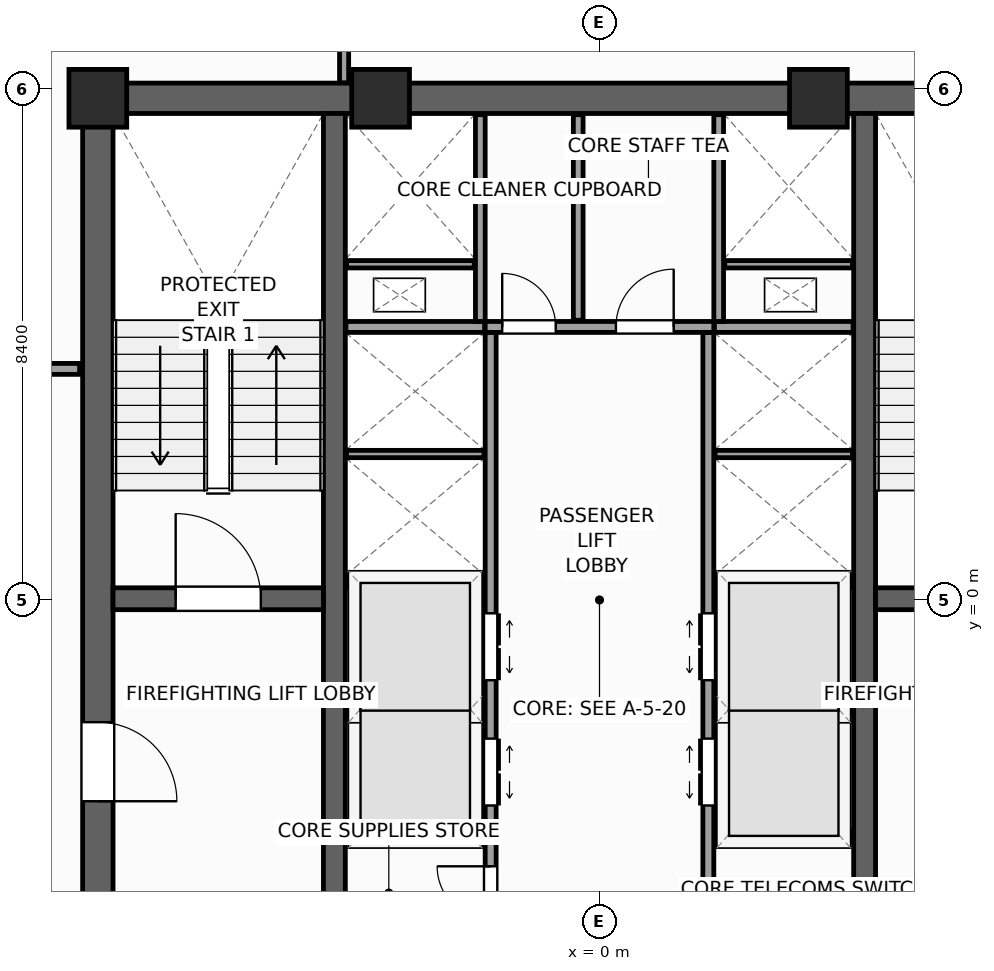
"""IFC4 building model, lengths in metres.
Left out: names, types, materials, properties, quantities, classifications, styles, units other than length and angle.
Written with IfcOpenShell. Run it as: python <this file> out.ifc"""

import sys

from ifc_helpers import new_model, si_unit, direction, frame, frame_2d, origin, origin_2d, place, context, subcontext, project, spatial, rectangle, extrude, source, transform, mapped, element, fill, save


model = new_model("IFC4")
c1 = context("Model", 3, precision=1e-05, world=origin(), true_north=direction((0.0, 1.0)))
c2 = subcontext(c1, "Body", "Model", "MODEL_VIEW")
j1 = project(units=[si_unit("LENGTHUNIT", "METRE"), si_unit("PLANEANGLEUNIT", "RADIAN")], contexts=[c1])
p1 = place(None, origin())
s1 = spatial("IfcSite", under=j1, at=p1, CompositionType="ELEMENT")
p2 = place(p1, origin())
s2 = spatial("IfcBuilding", under=s1, at=p2, CompositionType="ELEMENT")
p3 = place(p2, frame((0.0, 0.0, 221.2)))
s3 = spatial("IfcBuildingStorey", under=s2, at=p3, CompositionType="ELEMENT", Elevation=221.2)
p4 = place(p3, frame((-8.5, 8.25, 0.0), z_axis=(0.0, 0.0, 1.0), x_axis=(1.0, 0.0, 0.0)))
e1 = element("IfcWall", 1, at=p4, inside=s3, PredefinedType="SHEAR", context=c2, shape_type="SweptSolid", body=[
    extrude(rectangle(XDim=17.0, YDim=0.5, at=frame_2d((8.5, 0.0))), origin(), (0.0, 0.0, 1.0), 3.9),
])
p5 = place(p3, frame((-8.25, -8.0, 0.0), z_axis=(0.0, 0.0, 1.0), x_axis=(0.0, 1.0, 0.0)))
e2 = element("IfcWall", 2, at=p5, inside=s3, PredefinedType="SHEAR", context=c2, shape_type="SweptSolid", body=[
    extrude(rectangle(XDim=16.0, YDim=0.5, at=frame_2d((8.0, 0.0))), origin(), (0.0, 0.0, 1.0), 3.9),
])
p6 = place(p5, frame((4.69, 0.0, 0.0)))
e3 = element("IfcOpeningElement", 3, at=p6, cuts=e2, PredefinedType="OPENING", context=c2, shape_type="SweptSolid", body=[
    extrude(rectangle(XDim=1.3, YDim=2.2, at=frame_2d((0.65, 1.1))), frame((0.0, 0.26, 0.0), z_axis=(0.0, -1.0, 0.0), x_axis=(1.0, 0.0, 0.0)), (0.0, 0.0, 1.0), 0.52),
])
for number, where, z_axis, x_axis in (
    (4, (-4.36, -8.0, 0.0), (0.0, 0.0, 1.0), (0.0, 1.0, 0.0)),
    (5, (4.36, -8.0, 0.0), (0.0, 0.0, 1.0), (0.0, 1.0, 0.0)),
):
    element("IfcWall", number, at=place(p3, frame(where, z_axis=z_axis, x_axis=x_axis)), inside=s3, PredefinedType="SHEAR", context=c2, shape_type="SweptSolid", body=[
        extrude(rectangle(XDim=16.0, YDim=0.36, at=frame_2d((8.0, 0.0))), origin(), (0.0, 0.0, 1.0), 3.9),
    ])
p7 = place(p3, frame((-8.0, 0.02, 0.0), z_axis=(0.0, 0.0, 1.0), x_axis=(1.0, 0.0, 0.0)))
e6 = element("IfcWall", 6, at=p7, inside=s3, PredefinedType="SHEAR", context=c2, shape_type="SweptSolid", body=[
    extrude(rectangle(XDim=3.46, YDim=0.36, at=frame_2d((1.73, 0.0))), origin(), (0.0, 0.0, 1.0), 3.9),
])
p8 = place(p7, frame((1.03, 0.0, 0.0)))
e7 = element("IfcOpeningElement", 7, at=p8, cuts=e6, PredefinedType="OPENING", context=c2, shape_type="SweptSolid", body=[
    extrude(rectangle(XDim=1.4, YDim=2.2, at=frame_2d((0.7, 1.1))), frame((0.0, 0.19, 0.0), z_axis=(0.0, -1.0, 0.0), x_axis=(1.0, 0.0, 0.0)), (0.0, 0.0, 1.0), 0.38),
])
p9 = place(p3, frame((4.54, 0.02, 0.0), z_axis=(0.0, 0.0, 1.0), x_axis=(1.0, 0.0, 0.0)))
e8 = element("IfcWall", 8, at=p9, inside=s3, PredefinedType="SHEAR", context=c2, shape_type="SweptSolid", body=[
    extrude(rectangle(XDim=3.46, YDim=0.36, at=frame_2d((1.73, 0.0))), origin(), (0.0, 0.0, 1.0), 3.9),
])
p10 = place(p9, frame((1.03, 0.0, 0.0)))
e9 = element("IfcOpeningElement", 9, at=p10, cuts=e8, PredefinedType="OPENING", context=c2, shape_type="SweptSolid", body=[
    extrude(rectangle(XDim=1.4, YDim=2.2, at=frame_2d((0.7, 1.1))), frame((0.0, 0.19, 0.0), z_axis=(0.0, -1.0, 0.0), x_axis=(1.0, 0.0, 0.0)), (0.0, 0.0, 1.0), 0.38),
])
m1 = source(origin(), c2, "Body", "SweptSolid", [
    extrude(rectangle(XDim=0.95, YDim=0.95, at=origin_2d()), origin(), (0.0, 0.0, 1.0), 3.9),
])
for number, where, z_axis, x_axis in (
    (10, (-8.25, 8.25, 0.0), (0.0, 0.0, 1.0), (1.0, 0.0, 0.0)),
    (11, (-3.6, 8.25, 0.0), (0.0, 0.0, 1.0), (1.0, 0.0, 0.0)),
    (12, (3.6, 8.25, 0.0), (0.0, 0.0, 1.0), (1.0, 0.0, 0.0)),
):
    element("IfcColumn", number, at=place(p3, frame(where, z_axis=z_axis, x_axis=x_axis)), inside=s3, PredefinedType="PILASTER", context=c2, shape_type="MappedRepresentation", body=[
        mapped(m1, transform((0.0, 0.0, 0.0), scale=1.0)),
    ])
p11 = place(p3, frame((29.154, 6.733, 0.0), z_axis=(0.0, 0.0, 1.0), x_axis=(-0.77714192302, 0.629325378072, 0.0)))
e13 = element("IfcWall", 13, at=p11, inside=s3, PredefinedType="STANDARD", context=c2, shape_type="SweptSolid", body=[
    extrude(rectangle(XDim=36.84, YDim=0.34, at=frame_2d((18.42, 0.0))), origin(), (0.0, 0.0, 1.0), 2.96),
])
p12 = place(p11, frame((3.721, 0.0, 0.48)))
e14 = element("IfcOpeningElement", 14, at=p12, cuts=e13, PredefinedType="OPENING", context=c2, shape_type="SweptSolid", body=[
    extrude(rectangle(XDim=1.4, YDim=2.4, at=frame_2d((0.7, 1.2))), frame((0.0, 0.18, 0.0), z_axis=(0.0, -1.0, 0.0), x_axis=(1.0, 0.0, 0.0)), (0.0, 0.0, 1.0), 0.36),
])
p13 = place(p11, frame((9.809, 0.0, 0.58)))
e15 = element("IfcOpeningElement", 15, at=p13, cuts=e13, PredefinedType="OPENING", context=c2, shape_type="SweptSolid", body=[
    extrude(rectangle(XDim=1.75, YDim=2.3, at=frame_2d((0.875, 1.15))), frame((0.0, 0.18, 0.0), z_axis=(0.0, -1.0, 0.0), x_axis=(1.0, 0.0, 0.0)), (0.0, 0.0, 1.0), 0.36),
])
p14 = place(p11, frame((16.058, 0.0, 0.58)))
e16 = element("IfcOpeningElement", 16, at=p14, cuts=e13, PredefinedType="OPENING", context=c2, shape_type="SweptSolid", body=[
    extrude(rectangle(XDim=1.75, YDim=2.3, at=frame_2d((0.875, 1.15))), frame((0.0, 0.18, 0.0), z_axis=(0.0, -1.0, 0.0), x_axis=(1.0, 0.0, 0.0)), (0.0, 0.0, 1.0), 0.36),
])
p15 = place(p11, frame((24.176, 0.0, 0.58)))
e17 = element("IfcOpeningElement", 17, at=p15, cuts=e13, PredefinedType="OPENING", context=c2, shape_type="SweptSolid", body=[
    extrude(rectangle(XDim=1.75, YDim=2.3, at=frame_2d((0.875, 1.15))), frame((0.0, 0.18, 0.0), z_axis=(0.0, -1.0, 0.0), x_axis=(1.0, 0.0, 0.0)), (0.0, 0.0, 1.0), 0.36),
])
p16 = place(p11, frame((30.982, 0.0, 0.48)))
e18 = element("IfcOpeningElement", 18, at=p16, cuts=e13, PredefinedType="OPENING", context=c2, shape_type="SweptSolid", body=[
    extrude(rectangle(XDim=1.4, YDim=2.4, at=frame_2d((0.7, 1.2))), frame((0.0, 0.18, 0.0), z_axis=(0.0, -1.0, 0.0), x_axis=(1.0, 0.0, 0.0)), (0.0, 0.0, 1.0), 0.36),
])
p17 = place(p3, frame((-6.733, 29.154, 0.0), z_axis=(0.0, 0.0, 1.0), x_axis=(-0.629325378072, -0.77714192302, 0.0)))
e19 = element("IfcWall", 19, at=p17, inside=s3, PredefinedType="STANDARD", context=c2, shape_type="SweptSolid", body=[
    extrude(rectangle(XDim=36.84, YDim=0.34, at=frame_2d((18.42, 0.0))), origin(), (0.0, 0.0, 1.0), 2.96),
])
p18 = place(p17, frame((23.495, 0.0, 0.0)))
e20 = element("IfcOpeningElement", 20, at=p18, cuts=e19, PredefinedType="OPENING", context=c2, shape_type="SweptSolid", body=[
    extrude(rectangle(XDim=1.05, YDim=2.25, at=frame_2d((0.525, 1.125))), frame((0.0, 0.18, 0.0), z_axis=(0.0, -1.0, 0.0), x_axis=(1.0, 0.0, 0.0)), (0.0, 0.0, 1.0), 0.36),
])
p19 = place(p17, frame((3.721, 0.0, 0.48)))
e21 = element("IfcOpeningElement", 21, at=p19, cuts=e19, PredefinedType="OPENING", context=c2, shape_type="SweptSolid", body=[
    extrude(rectangle(XDim=1.4, YDim=2.4, at=frame_2d((0.7, 1.2))), frame((0.0, 0.18, 0.0), z_axis=(0.0, -1.0, 0.0), x_axis=(1.0, 0.0, 0.0)), (0.0, 0.0, 1.0), 0.36),
])
p20 = place(p17, frame((9.809, 0.0, 0.58)))
e22 = element("IfcOpeningElement", 22, at=p20, cuts=e19, PredefinedType="OPENING", context=c2, shape_type="SweptSolid", body=[
    extrude(rectangle(XDim=1.75, YDim=2.3, at=frame_2d((0.875, 1.15))), frame((0.0, 0.18, 0.0), z_axis=(0.0, -1.0, 0.0), x_axis=(1.0, 0.0, 0.0)), (0.0, 0.0, 1.0), 0.36),
])
p21 = place(p17, frame((16.058, 0.0, 0.58)))
e23 = element("IfcOpeningElement", 23, at=p21, cuts=e19, PredefinedType="OPENING", context=c2, shape_type="SweptSolid", body=[
    extrude(rectangle(XDim=1.75, YDim=2.3, at=frame_2d((0.875, 1.15))), frame((0.0, 0.18, 0.0), z_axis=(0.0, -1.0, 0.0), x_axis=(1.0, 0.0, 0.0)), (0.0, 0.0, 1.0), 0.36),
])
p22 = place(p17, frame((25.676, 0.0, 0.58)))
e24 = element("IfcOpeningElement", 24, at=p22, cuts=e19, PredefinedType="OPENING", context=c2, shape_type="SweptSolid", body=[
    extrude(rectangle(XDim=1.75, YDim=2.3, at=frame_2d((0.875, 1.15))), frame((0.0, 0.18, 0.0), z_axis=(0.0, -1.0, 0.0), x_axis=(1.0, 0.0, 0.0)), (0.0, 0.0, 1.0), 0.36),
])
p23 = place(p17, frame((30.232, 0.0, 0.48)))
e25 = element("IfcOpeningElement", 25, at=p23, cuts=e19, PredefinedType="OPENING", context=c2, shape_type="SweptSolid", body=[
    extrude(rectangle(XDim=1.4, YDim=2.4, at=frame_2d((0.7, 1.2))), frame((0.0, 0.18, 0.0), z_axis=(0.0, -1.0, 0.0), x_axis=(1.0, 0.0, 0.0)), (0.0, 0.0, 1.0), 0.36),
])
p24 = place(p3, frame((-1.79, -7.98, 0.0), z_axis=(0.0, 0.0, 1.0), x_axis=(0.0, 1.0, 0.0)))
e26 = element("IfcWall", 26, at=p24, inside=s3, PredefinedType="PARTITIONING", context=c2, shape_type="SweptSolid", body=[
    extrude(rectangle(XDim=12.38, YDim=0.18, at=frame_2d((6.19, 0.0))), origin(), (0.0, 0.0, 1.0), 3.66),
])
p25 = place(p24, frame((4.6, 0.0, 0.0)))
e27 = element("IfcOpeningElement", 27, at=p25, cuts=e26, PredefinedType="OPENING", context=c2, shape_type="SweptSolid", body=[
    extrude(rectangle(XDim=1.1, YDim=2.2, at=frame_2d((0.55, 1.1))), frame((0.0, 0.1, 0.0), z_axis=(0.0, -1.0, 0.0), x_axis=(1.0, 0.0, 0.0)), (0.0, 0.0, 1.0), 0.2),
])
p26 = place(p24, frame((6.66, 0.0, 0.0)))
e28 = element("IfcOpeningElement", 28, at=p26, cuts=e26, PredefinedType="OPENING", context=c2, shape_type="SweptSolid", body=[
    extrude(rectangle(XDim=1.1, YDim=2.2, at=frame_2d((0.55, 1.1))), frame((0.0, 0.1, 0.0), z_axis=(0.0, -1.0, 0.0), x_axis=(1.0, 0.0, 0.0)), (0.0, 0.0, 1.0), 0.2),
])
p27 = place(p24, frame((0.55, 0.0, 0.0)))
e29 = element("IfcOpeningElement", 29, at=p27, cuts=e26, PredefinedType="OPENING", context=c2, shape_type="SweptSolid", body=[
    extrude(rectangle(XDim=1.15, YDim=2.25, at=frame_2d((0.575, 1.125))), frame((0.0, 0.1, 0.0), z_axis=(0.0, -1.0, 0.0), x_axis=(1.0, 0.0, 0.0)), (0.0, 0.0, 1.0), 0.2),
])
p28 = place(p24, frame((2.72, 0.0, 0.0)))
e30 = element("IfcOpeningElement", 30, at=p28, cuts=e26, PredefinedType="OPENING", context=c2, shape_type="SweptSolid", body=[
    extrude(rectangle(XDim=0.88, YDim=2.1, at=frame_2d((0.44, 1.05))), frame((0.0, 0.1, 0.0), z_axis=(0.0, -1.0, 0.0), x_axis=(1.0, 0.0, 0.0)), (0.0, 0.0, 1.0), 0.2),
])
p29 = place(p3, frame((1.79, -7.98, 0.0), z_axis=(0.0, 0.0, 1.0), x_axis=(0.0, 1.0, 0.0)))
e31 = element("IfcWall", 31, at=p29, inside=s3, PredefinedType="PARTITIONING", context=c2, shape_type="SweptSolid", body=[
    extrude(rectangle(XDim=12.38, YDim=0.18, at=frame_2d((6.19, 0.0))), origin(), (0.0, 0.0, 1.0), 3.66),
])
p30 = place(p29, frame((4.6, 0.0, 0.0)))
e32 = element("IfcOpeningElement", 32, at=p30, cuts=e31, PredefinedType="OPENING", context=c2, shape_type="SweptSolid", body=[
    extrude(rectangle(XDim=1.1, YDim=2.2, at=frame_2d((0.55, 1.1))), frame((0.0, 0.1, 0.0), z_axis=(0.0, -1.0, 0.0), x_axis=(1.0, 0.0, 0.0)), (0.0, 0.0, 1.0), 0.2),
])
p31 = place(p29, frame((6.66, 0.0, 0.0)))
e33 = element("IfcOpeningElement", 33, at=p31, cuts=e31, PredefinedType="OPENING", context=c2, shape_type="SweptSolid", body=[
    extrude(rectangle(XDim=1.1, YDim=2.2, at=frame_2d((0.55, 1.1))), frame((0.0, 0.1, 0.0), z_axis=(0.0, -1.0, 0.0), x_axis=(1.0, 0.0, 0.0)), (0.0, 0.0, 1.0), 0.2),
])
p32 = place(p29, frame((1.4, 0.0, 0.0)))
e34 = element("IfcOpeningElement", 34, at=p32, cuts=e31, PredefinedType="OPENING", context=c2, shape_type="SweptSolid", body=[
    extrude(rectangle(XDim=1.15, YDim=2.25, at=frame_2d((0.575, 1.125))), frame((0.0, 0.1, 0.0), z_axis=(0.0, -1.0, 0.0), x_axis=(1.0, 0.0, 0.0)), (0.0, 0.0, 1.0), 0.2),
])
p33 = place(p3, frame((-1.88, 4.49, 0.0), z_axis=(0.0, 0.0, 1.0), x_axis=(1.0, 0.0, 0.0)))
e35 = element("IfcWall", 35, at=p33, inside=s3, PredefinedType="PARTITIONING", context=c2, shape_type="SweptSolid", body=[
    extrude(rectangle(XDim=3.76, YDim=0.18, at=frame_2d((1.88, 0.0))), origin(), (0.0, 0.0, 1.0), 3.66),
])
p34 = place(p33, frame((0.28, 0.0, 0.0)))
e36 = element("IfcOpeningElement", 36, at=p34, cuts=e35, PredefinedType="OPENING", context=c2, shape_type="SweptSolid", body=[
    extrude(rectangle(XDim=0.88, YDim=2.1, at=frame_2d((0.44, 1.05))), frame((0.0, 0.1, 0.0), z_axis=(0.0, -1.0, 0.0), x_axis=(1.0, 0.0, 0.0)), (0.0, 0.0, 1.0), 0.2),
])
p35 = place(p33, frame((2.15, 0.0, 0.0)))
e37 = element("IfcOpeningElement", 37, at=p35, cuts=e35, PredefinedType="OPENING", context=c2, shape_type="SweptSolid", body=[
    extrude(rectangle(XDim=0.95, YDim=2.1, at=frame_2d((0.475, 1.05))), frame((0.0, 0.1, 0.0), z_axis=(0.0, -1.0, 0.0), x_axis=(1.0, 0.0, 0.0)), (0.0, 0.0, 1.0), 0.2),
])
for number, where, z_axis, x_axis in (
    (38, (-4.17, -3.9, 0.0), (0.0, 0.0, 1.0), (1.0, 0.0, 0.0)),
    (39, (1.89, -3.9, 0.0), (0.0, 0.0, 1.0), (1.0, 0.0, 0.0)),
    (40, (-4.17, 0.3, 0.0), (0.0, 0.0, 1.0), (1.0, 0.0, 0.0)),
    (41, (1.89, 0.3, 0.0), (0.0, 0.0, 1.0), (1.0, 0.0, 0.0)),
    (42, (-4.17, 4.49, 0.0), (0.0, 0.0, 1.0), (1.0, 0.0, 0.0)),
    (43, (1.89, 4.49, 0.0), (0.0, 0.0, 1.0), (1.0, 0.0, 0.0)),
):
    element("IfcWall", number, at=place(p3, frame(where, z_axis=z_axis, x_axis=x_axis)), inside=s3, PredefinedType="PARTITIONING", context=c2, shape_type="SweptSolid", body=[
        extrude(rectangle(XDim=2.28, YDim=0.18, at=frame_2d((1.14, 0.0))), origin(), (0.0, 0.0, 1.0), 3.66),
    ])
for number, where, z_axis, x_axis in (
    (44, (-4.16, -1.8, 0.0), (0.0, 0.0, 1.0), (1.0, 0.0, 0.0)),
    (45, (1.9, -1.8, 0.0), (0.0, 0.0, 1.0), (1.0, 0.0, 0.0)),
    (46, (-4.16, 2.4, 0.0), (0.0, 0.0, 1.0), (1.0, 0.0, 0.0)),
    (47, (1.9, 2.4, 0.0), (0.0, 0.0, 1.0), (1.0, 0.0, 0.0)),
):
    element("IfcWall", number, at=place(p3, frame(where, z_axis=z_axis, x_axis=x_axis)), inside=s3, PredefinedType="PARTITIONING", context=c2, shape_type="SweptSolid", body=[
        extrude(rectangle(XDim=2.26, YDim=0.12, at=frame_2d((1.13, 0.0))), origin(), (0.0, 0.0, 1.0), 3.66),
    ])
for number, where, z_axis, x_axis in (
    (48, (-1.96, 4.58, 0.0), (0.0, 0.0, 1.0), (0.0, 1.0, 0.0)),
    (49, (1.96, 4.58, 0.0), (0.0, 0.0, 1.0), (0.0, 1.0, 0.0)),
):
    element("IfcWall", number, at=place(p3, frame(where, z_axis=z_axis, x_axis=x_axis)), inside=s3, PredefinedType="PARTITIONING", context=c2, shape_type="SweptSolid", body=[
        extrude(rectangle(XDim=3.4, YDim=0.16, at=frame_2d((1.7, 0.0))), origin(), (0.0, 0.0, 1.0), 3.66),
    ])
for number, where, z_axis, x_axis in (
    (50, (-4.16, 5.52, 0.0), (0.0, 0.0, 1.0), (1.0, 0.0, 0.0)),
    (51, (2.06, 5.52, 0.0), (0.0, 0.0, 1.0), (1.0, 0.0, 0.0)),
):
    element("IfcWall", number, at=place(p3, frame(where, z_axis=z_axis, x_axis=x_axis)), inside=s3, PredefinedType="PARTITIONING", context=c2, shape_type="SweptSolid", body=[
        extrude(rectangle(XDim=2.1, YDim=0.12, at=frame_2d((1.05, 0.0))), origin(), (0.0, 0.0, 1.0), 3.66),
    ])
p36 = place(p3, frame((-0.35, 4.6, 0.0), z_axis=(0.0, 0.0, 1.0), x_axis=(0.0, 1.0, 0.0)))
e52 = element("IfcWall", 52, at=p36, inside=s3, PredefinedType="PARTITIONING", context=c2, shape_type="SweptSolid", body=[
    extrude(rectangle(XDim=3.38, YDim=0.16, at=frame_2d((1.69, 0.0))), origin(), (0.0, 0.0, 1.0), 3.66),
])
p37 = place(p3, frame((-11.4, 3.8, 0.0), z_axis=(0.0, 0.0, 1.0), x_axis=(1.0, 0.0, 0.0)))
e53 = element("IfcWall", 53, at=p37, inside=s3, PredefinedType="PARTITIONING", context=c2, shape_type="SweptSolid", body=[
    extrude(rectangle(XDim=2.85, YDim=0.18, at=frame_2d((1.425, 0.0))), origin(), (0.0, 0.0, 1.0), 3.66),
])
p38 = place(p37, frame((0.875, 0.0, 0.0)))
e54 = element("IfcOpeningElement", 54, at=p38, cuts=e53, PredefinedType="OPENING", context=c2, shape_type="SweptSolid", body=[
    extrude(rectangle(XDim=1.1, YDim=2.2, at=frame_2d((0.55, 1.1))), frame((0.0, 0.1, 0.0), z_axis=(0.0, -1.0, 0.0), x_axis=(1.0, 0.0, 0.0)), (0.0, 0.0, 1.0), 0.2),
])
p39 = place(p3, frame((-4.2, 8.505, 0.0), z_axis=(0.0, 0.0, 1.0), x_axis=(0.0, 1.0, 0.0)))
e55 = element("IfcWall", 55, at=p39, inside=s3, PredefinedType="PARTITIONING", context=c2, shape_type="SweptSolid", body=[
    extrude(rectangle(XDim=18.026, YDim=0.15, at=frame_2d((9.013, 0.0))), origin(), (0.0, 0.0, 1.0), 3.66),
])
m2 = source(origin(), c2, "Body", "SweptSolid", [
    extrude(rectangle(XDim=1.4, YDim=2.2, at=frame_2d((0.7, 1.1))), frame((0.0, 0.025, 0.0), z_axis=(0.0, -1.0, 0.0), x_axis=(1.0, 0.0, 0.0)), (0.0, 0.0, 1.0), 0.05),
])
p40 = place(p8, origin())
e56 = element("IfcDoor", 56, at=p40, inside=s3, OperationType="SINGLE_SWING_LEFT", PredefinedType="DOOR", context=c2, shape_type="MappedRepresentation", body=[
    mapped(m2, transform((0.0, 0.0, 0.0), scale=1.0)),
])
fill(e7, e56)
m3 = source(origin(), c2, "Body", "SweptSolid", [
    extrude(rectangle(XDim=1.3, YDim=2.2, at=frame_2d((0.65, 1.1))), frame((0.0, 0.025, 0.0), z_axis=(0.0, -1.0, 0.0), x_axis=(1.0, 0.0, 0.0)), (0.0, 0.0, 1.0), 0.05),
])
p41 = place(p6, frame((1.3, 0.0, 0.0), z_axis=(0.0, 0.0, 1.0), x_axis=(-1.0, 0.0, 0.0)))
e57 = element("IfcDoor", 57, at=p41, inside=s3, OperationType="SINGLE_SWING_LEFT", PredefinedType="DOOR", context=c2, shape_type="MappedRepresentation", body=[
    mapped(m3, transform((0.0, 0.0, 0.0), scale=1.0)),
])
fill(e3, e57)
m4 = source(origin(), c2, "Body", "SweptSolid", [
    extrude(rectangle(XDim=1.1, YDim=2.2, at=frame_2d((0.55, 1.1))), frame((0.0, 0.025, 0.0), z_axis=(0.0, -1.0, 0.0), x_axis=(1.0, 0.0, 0.0)), (0.0, 0.0, 1.0), 0.05),
])
p42 = place(p25, frame((1.1, 0.0, 0.0), z_axis=(0.0, 0.0, 1.0), x_axis=(-1.0, 0.0, 0.0)))
e58 = element("IfcDoor", 58, at=p42, inside=s3, OperationType="DOUBLE_DOOR_SLIDING", PredefinedType="DOOR", context=c2, shape_type="MappedRepresentation", body=[
    mapped(m4, transform((0.0, 0.0, 0.0), scale=1.0)),
])
fill(e27, e58)
p43 = place(p26, frame((1.1, 0.0, 0.0), z_axis=(0.0, 0.0, 1.0), x_axis=(-1.0, 0.0, 0.0)))
e59 = element("IfcDoor", 59, at=p43, inside=s3, OperationType="DOUBLE_DOOR_SLIDING", PredefinedType="DOOR", context=c2, shape_type="MappedRepresentation", body=[
    mapped(m4, transform((0.0, 0.0, 0.0), scale=1.0)),
])
fill(e28, e59)
p44 = place(p30, origin())
e60 = element("IfcDoor", 60, at=p44, inside=s3, OperationType="DOUBLE_DOOR_SLIDING", PredefinedType="DOOR", context=c2, shape_type="MappedRepresentation", body=[
    mapped(m4, transform((0.0, 0.0, 0.0), scale=1.0)),
])
fill(e32, e60)
p45 = place(p31, origin())
e61 = element("IfcDoor", 61, at=p45, inside=s3, OperationType="DOUBLE_DOOR_SLIDING", PredefinedType="DOOR", context=c2, shape_type="MappedRepresentation", body=[
    mapped(m4, transform((0.0, 0.0, 0.0), scale=1.0)),
])
fill(e33, e61)
m5 = source(origin(), c2, "Body", "SweptSolid", [
    extrude(rectangle(XDim=0.88, YDim=2.1, at=frame_2d((0.44, 1.05))), frame((0.0, 0.025, 0.0), z_axis=(0.0, -1.0, 0.0), x_axis=(1.0, 0.0, 0.0)), (0.0, 0.0, 1.0), 0.05),
])
p46 = place(p28, origin())
e62 = element("IfcDoor", 62, at=p46, inside=s3, OperationType="SINGLE_SWING_RIGHT", PredefinedType="DOOR", context=c2, shape_type="MappedRepresentation", body=[
    mapped(m5, transform((0.0, 0.0, 0.0), scale=1.0)),
])
fill(e30, e62)
p47 = place(p34, origin())
e63 = element("IfcDoor", 63, at=p47, inside=s3, OperationType="SINGLE_SWING_LEFT", PredefinedType="DOOR", context=c2, shape_type="MappedRepresentation", body=[
    mapped(m5, transform((0.0, 0.0, 0.0), scale=1.0)),
])
fill(e36, e63)
m6 = source(origin(), c2, "Body", "SweptSolid", [
    extrude(rectangle(XDim=0.95, YDim=2.1, at=frame_2d((0.475, 1.05))), frame((0.0, 0.025, 0.0), z_axis=(0.0, -1.0, 0.0), x_axis=(1.0, 0.0, 0.0)), (0.0, 0.0, 1.0), 0.05),
])
p48 = place(p35, origin())
e64 = element("IfcDoor", 64, at=p48, inside=s3, OperationType="SINGLE_SWING_RIGHT", PredefinedType="DOOR", context=c2, shape_type="MappedRepresentation", body=[
    mapped(m6, transform((0.0, 0.0, 0.0), scale=1.0)),
])
fill(e37, e64)
save(model, sys.argv[1])
